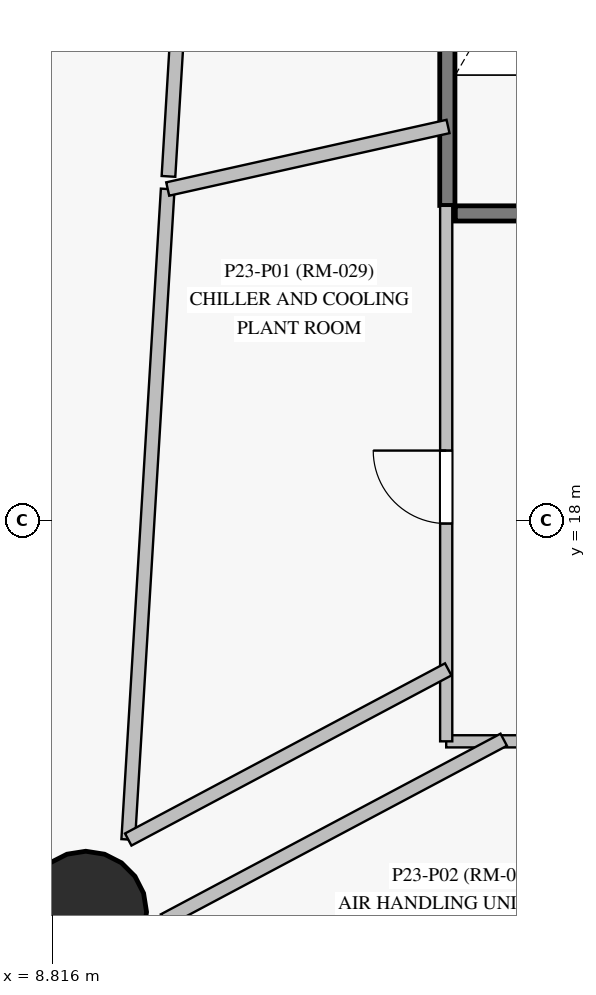
"""IFC4 building model, lengths in metres.
Left out: names, types, materials, properties, quantities, classifications, styles, units other than length and angle.
Written with IfcOpenShell. Run it as: python <this file> out.ifc"""

import sys

from ifc_helpers import new_model, si_unit, direction, frame, frame_2d, origin, origin_with_axes, origin_2d, place, context, subcontext, project, spatial, rectangle, circle, extrude, source, transform, mapped, element, fill, save


model = new_model("IFC4")
c1 = context("Model", 3, precision=1e-05, world=origin(), true_north=direction((0.0, 1.0)))
c2 = subcontext(c1, "Body", "Model", "MODEL_VIEW")
j1 = project(units=[si_unit("LENGTHUNIT", "METRE"), si_unit("PLANEANGLEUNIT", "RADIAN")], contexts=[c1])
p1 = place(None, origin())
s1 = spatial("IfcSite", under=j1, at=p1, CompositionType="ELEMENT")
p2 = place(p1, origin())
s2 = spatial("IfcBuilding", under=s1, at=p2, CompositionType="ELEMENT")
p3 = place(p2, frame((0.0, 0.0, 87.7)))
s3 = spatial("IfcBuildingStorey", under=s2, at=p3, CompositionType="ELEMENT", Elevation=87.7)
m1 = source(origin_with_axes(), c2, "Body", "SweptSolid", [
    extrude(circle(Radius=0.8, at=origin_2d()), origin(), (0.0, 0.0, 1.0), 4.5),
])
p4 = place(p3, frame((9.258, 12.854, 0.0), z_axis=(0.0, 0.0, 1.0), x_axis=(1.0, 0.0, 0.0)))
e1 = element("IfcColumn", 1, at=p4, inside=s3, PredefinedType="COLUMN", context=c2, shape_type="MappedRepresentation", body=[
    mapped(m1, transform((0.0, 0.0, 0.0), scale=1.0)),
])
p5 = place(p3, frame((14.015, 22.15, 0.0), z_axis=(0.0, 0.0, 1.0), x_axis=(0.0, 1.0, 0.0)))
e2 = element("IfcWall", 2, at=p5, inside=s3, PredefinedType="SHEAR", context=c2, shape_type="SweptSolid", body=[
    extrude(rectangle(XDim=7.35, YDim=0.2, at=frame_2d((3.675, 0.0))), origin(), (0.0, 0.0, 1.0), 4.275),
])
p6 = place(p3, frame((14.12, 22.045, 0.0), z_axis=(0.0, 0.0, 1.0), x_axis=(1.0, 0.0, 0.0)))
e3 = element("IfcWall", 3, at=p6, inside=s3, PredefinedType="SHEAR", context=c2, shape_type="SweptSolid", body=[
    extrude(rectangle(XDim=3.26, YDim=0.2, at=frame_2d((1.63, 0.0))), origin(), (0.0, 0.0, 1.0), 4.275),
])
p7 = place(p3, frame((40.25, 15.1, 0.0), z_axis=(0.0, 0.0, 1.0), x_axis=(-1.0, 0.0, 0.0)))
e4 = element("IfcWall", 4, at=p7, inside=s3, PredefinedType="PARTITIONING", context=c2, shape_type="SweptSolid", body=[
    extrude(rectangle(XDim=26.25, YDim=0.16, at=frame_2d((13.125, 0.0))), origin(), (0.0, 0.0, 1.0), 2.775),
])
p8 = place(p7, frame((8.712, 0.0, 0.0)))
e5 = element("IfcOpeningElement", 5, at=p8, cuts=e4, PredefinedType="OPENING", context=c2, shape_type="SweptSolid", body=[
    extrude(rectangle(XDim=0.96, YDim=2.15, at=frame_2d((0.48, 1.075))), frame((0.0, 0.09, 0.0), z_axis=(0.0, -1.0, 0.0), x_axis=(1.0, 0.0, 0.0)), (0.0, 0.0, 1.0), 0.18),
])
p9 = place(p7, frame((19.977, 0.0, 0.0)))
e6 = element("IfcOpeningElement", 6, at=p9, cuts=e4, PredefinedType="OPENING", context=c2, shape_type="SweptSolid", body=[
    extrude(rectangle(XDim=0.96, YDim=2.15, at=frame_2d((0.48, 1.075))), frame((0.0, 0.09, 0.0), z_axis=(0.0, -1.0, 0.0), x_axis=(1.0, 0.0, 0.0)), (0.0, 0.0, 1.0), 0.18),
])
p10 = place(p7, frame((18.873, 0.0, 0.0)))
e7 = element("IfcOpeningElement", 7, at=p10, cuts=e4, PredefinedType="OPENING", context=c2, shape_type="SweptSolid", body=[
    extrude(rectangle(XDim=0.96, YDim=2.15, at=frame_2d((0.48, 1.075))), frame((0.0, 0.09, 0.0), z_axis=(0.0, -1.0, 0.0), x_axis=(1.0, 0.0, 0.0)), (0.0, 0.0, 1.0), 0.18),
])
p11 = place(p7, frame((14.914, 0.0, 0.0)))
e8 = element("IfcOpeningElement", 8, at=p11, cuts=e4, PredefinedType="OPENING", context=c2, shape_type="SweptSolid", body=[
    extrude(rectangle(XDim=0.96, YDim=2.15, at=frame_2d((0.48, 1.075))), frame((0.0, 0.09, 0.0), z_axis=(0.0, -1.0, 0.0), x_axis=(1.0, 0.0, 0.0)), (0.0, 0.0, 1.0), 0.18),
])
p12 = place(p7, frame((23.44, 0.0, 0.0)))
e9 = element("IfcOpeningElement", 9, at=p12, cuts=e4, PredefinedType="OPENING", context=c2, shape_type="SweptSolid", body=[
    extrude(rectangle(XDim=0.86, YDim=2.04, at=frame_2d((0.43, 1.02))), frame((0.0, 0.09, 0.0), z_axis=(0.0, -1.0, 0.0), x_axis=(1.0, 0.0, 0.0)), (0.0, 0.0, 1.0), 0.18),
])
p13 = place(p3, frame((10.346, 22.532, 0.0), z_axis=(0.0, 0.0, 1.0), x_axis=(0.060558802641, 0.998164631422, 0.0)))
e10 = element("IfcWall", 10, at=p13, inside=s3, PredefinedType="PARTITIONING", context=c2, shape_type="SweptSolid", body=[
    extrude(rectangle(XDim=13.183, YDim=0.18, at=frame_2d((6.591, 0.0))), origin(), (0.0, 0.0, 1.0), 3.375),
])
p14 = place(p3, frame((9.817, 13.808, 0.0), z_axis=(0.0, 0.0, 1.0), x_axis=(0.060568138709, 0.998164064958, 0.0)))
e11 = element("IfcWall", 11, at=p14, inside=s3, PredefinedType="PARTITIONING", context=c2, shape_type="SweptSolid", body=[
    extrude(rectangle(XDim=8.573, YDim=0.18, at=frame_2d((4.287, 0.0))), origin(), (0.0, 0.0, 1.0), 3.375),
])
p15 = place(p3, frame((14.0, 15.1, 0.0), z_axis=(0.0, 0.0, 1.0), x_axis=(0.0, 1.0, 0.0)))
e12 = element("IfcWall", 12, at=p15, inside=s3, PredefinedType="PARTITIONING", context=c2, shape_type="SweptSolid", body=[
    extrude(rectangle(XDim=7.045, YDim=0.16, at=frame_2d((3.522, 0.0))), origin(), (0.0, 0.0, 1.0), 4.275),
])
p16 = place(p15, frame((2.865, 0.0, 0.0)))
e13 = element("IfcOpeningElement", 13, at=p16, cuts=e12, PredefinedType="OPENING", context=c2, shape_type="SweptSolid", body=[
    extrude(rectangle(XDim=0.96, YDim=2.15, at=frame_2d((0.48, 1.075))), frame((0.0, 0.09, 0.0), z_axis=(0.0, -1.0, 0.0), x_axis=(1.0, 0.0, 0.0)), (0.0, 0.0, 1.0), 0.18),
])
p17 = place(p3, frame((15.143, 9.352, 0.0), z_axis=(0.0, 0.0, 1.0), x_axis=(-0.819700282041, 0.572792674205, 0.0)))
e14 = element("IfcWall", 14, at=p17, inside=s3, PredefinedType="PARTITIONING", context=c2, shape_type="SweptSolid", body=[
    extrude(rectangle(XDim=5.923, YDim=0.18, at=frame_2d((2.961, 0.0))), origin(), (0.0, 0.0, 1.0), 2.875),
])
p18 = place(p3, frame((10.288, 12.745, 0.0), z_axis=(0.0, 0.0, 1.0), x_axis=(0.882947684132, 0.469471391126, 0.0)))
e15 = element("IfcWall", 15, at=p18, inside=s3, PredefinedType="PARTITIONING", context=c2, shape_type="SweptSolid", body=[
    extrude(rectangle(XDim=5.062, YDim=0.18, at=frame_2d((2.531, 0.0))), origin(), (0.0, 0.0, 1.0), 2.775),
])
p19 = place(p3, frame((14.027, 16.046, 0.0), z_axis=(0.0, 0.0, 1.0), x_axis=(-0.882953233195, -0.469460954702, 0.0)))
e16 = element("IfcWall", 16, at=p19, inside=s3, PredefinedType="PARTITIONING", context=c2, shape_type="SweptSolid", body=[
    extrude(rectangle(XDim=4.768, YDim=0.18, at=frame_2d((2.384, 0.0))), origin(), (0.0, 0.0, 1.0), 2.775),
])
p20 = place(p3, frame((10.336, 22.366, 0.0), z_axis=(0.0, 0.0, 1.0), x_axis=(0.976004273592, 0.21775136723, 0.0)))
e17 = element("IfcWall", 17, at=p20, inside=s3, PredefinedType="PARTITIONING", context=c2, shape_type="SweptSolid", body=[
    extrude(rectangle(XDim=3.778, YDim=0.18, at=frame_2d((1.889, 0.0))), origin(), (0.0, 0.0, 1.0), 4.275),
])
m2 = source(origin_with_axes(), c2, "Body", "SweptSolid", [
    extrude(rectangle(XDim=0.96, YDim=2.15, at=frame_2d((0.48, 1.075))), frame((0.0, 0.025, 0.0), z_axis=(0.0, -1.0, 0.0), x_axis=(1.0, 0.0, 0.0)), (0.0, 0.0, 1.0), 0.05),
])
p21 = place(p16, origin())
e18 = element("IfcDoor", 18, at=p21, inside=s3, OperationType="SINGLE_SWING_RIGHT", PredefinedType="DOOR", context=c2, shape_type="MappedRepresentation", body=[
    mapped(m2, transform((0.0, 0.0, 0.0), scale=1.0)),
])
fill(e13, e18)
save(model, sys.argv[1])
